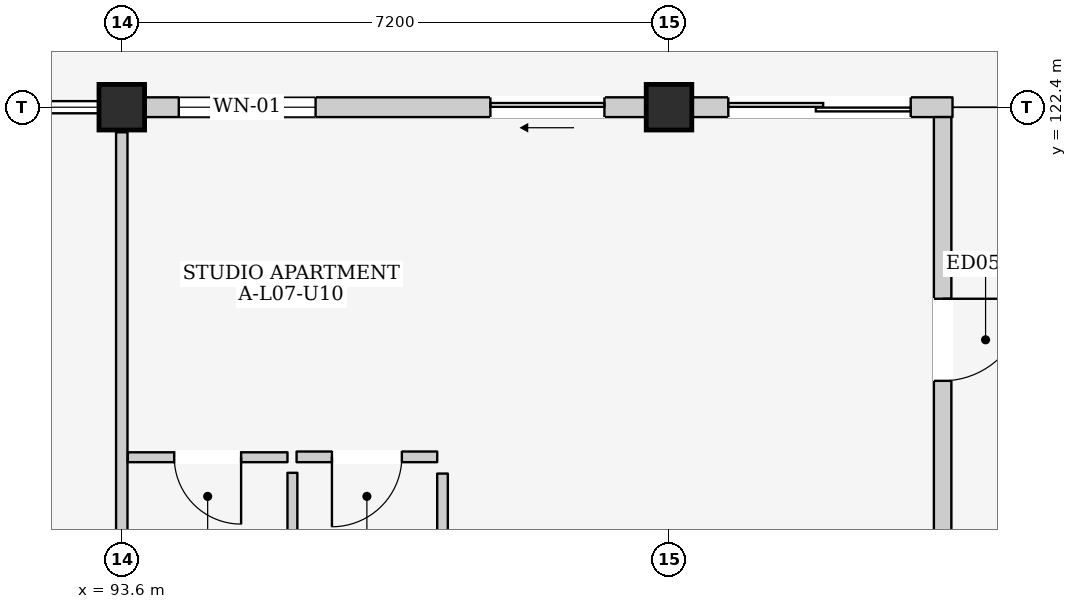
"""IFC4 building model, lengths in metres.
Left out: names, types, materials, properties, quantities, classifications, styles, units other than length and angle.
Written with IfcOpenShell. Run it as: python <this file> out.ifc"""

import sys

from ifc_helpers import new_model, si_unit, direction, frame, frame_2d, origin, origin_2d, place, context, subcontext, project, spatial, rectangle, extrude, element, fill, save


model = new_model("IFC4")
c1 = context("Model", 3, precision=1e-05, world=origin(), true_north=direction((0.0, 1.0)))
c2 = subcontext(c1, "Body", "Model", "MODEL_VIEW")
j1 = project(units=[si_unit("LENGTHUNIT", "METRE"), si_unit("PLANEANGLEUNIT", "RADIAN")], contexts=[c1])
p1 = place(None, origin())
s1 = spatial("IfcSite", under=j1, at=p1, CompositionType="ELEMENT")
p2 = place(p1, origin())
s2 = spatial("IfcBuilding", under=s1, at=p2, CompositionType="ELEMENT")
p3 = place(p2, frame((0.0, 0.0, 25.1)))
s3 = spatial("IfcBuildingStorey", under=s2, at=p3, CompositionType="ELEMENT", Elevation=25.1)
for number, where, z_axis, x_axis in (
    (1, (93.6, 122.4, 0.0), (0.0, 0.0, 1.0), (1.0, 0.0, 0.0)),
    (2, (100.8, 122.4, 0.0), (0.0, 0.0, 1.0), (1.0, 0.0, 0.0)),
):
    element("IfcColumn", number, at=place(p3, frame(where, z_axis=z_axis, x_axis=x_axis)), inside=s3, PredefinedType="COLUMN", context=c2, shape_type="SweptSolid", body=[
        extrude(rectangle(XDim=0.6, YDim=0.6, at=origin_2d()), origin(), (0.0, 0.0, 1.0), 3.2),
    ])
p4 = place(p3, frame((93.9, 122.4, 0.0), z_axis=(0.0, 0.0, 1.0), x_axis=(1.0, 0.0, 0.0)))
e3 = element("IfcWall", 3, at=p4, inside=s3, PredefinedType="ELEMENTEDWALL", context=c2, shape_type="SweptSolid", body=[
    extrude(rectangle(XDim=6.6, YDim=0.26, at=frame_2d((3.3, 0.0))), origin(), (0.0, 0.0, 1.0), 2.525),
])
p5 = place(p4, frame((4.55, 0.0, 0.0)))
e4 = element("IfcOpeningElement", 4, at=p5, cuts=e3, PredefinedType="OPENING", context=c2, shape_type="SweptSolid", body=[
    extrude(rectangle(XDim=1.5, YDim=2.12, at=frame_2d((0.75, 1.06))), frame((0.0, 0.145, 0.0), z_axis=(0.0, -1.0, 0.0), x_axis=(1.0, 0.0, 0.0)), (0.0, 0.0, 1.0), 0.29),
])
p6 = place(p4, frame((0.45, 0.0, 0.9)))
e5 = element("IfcOpeningElement", 5, at=p6, cuts=e3, PredefinedType="OPENING", context=c2, shape_type="SweptSolid", body=[
    extrude(rectangle(XDim=1.8, YDim=1.5, at=frame_2d((0.9, 0.75))), frame((0.0, 0.145, 0.0), z_axis=(0.0, -1.0, 0.0), x_axis=(1.0, 0.0, 0.0)), (0.0, 0.0, 1.0), 0.29),
])
p7 = place(p3, frame((101.1, 122.4, 0.0), z_axis=(0.0, 0.0, 1.0), x_axis=(1.0, 0.0, 0.0)))
e6 = element("IfcWall", 6, at=p7, inside=s3, PredefinedType="ELEMENTEDWALL", context=c2, shape_type="SweptSolid", body=[
    extrude(rectangle(XDim=3.43, YDim=0.26, at=frame_2d((1.715, 0.0))), origin(), (0.0, 0.0, 1.0), 2.325),
])
p8 = place(p7, frame((0.48, 0.0, 0.0)))
e7 = element("IfcOpeningElement", 7, at=p8, cuts=e6, PredefinedType="OPENING", context=c2, shape_type="SweptSolid", body=[
    extrude(rectangle(XDim=2.4, YDim=2.12, at=frame_2d((1.2, 1.06))), frame((0.0, 0.145, 0.0), z_axis=(0.0, -1.0, 0.0), x_axis=(1.0, 0.0, 0.0)), (0.0, 0.0, 1.0), 0.29),
])
p9 = place(p3, frame((104.4, 115.2, 0.0), z_axis=(0.0, 0.0, 1.0), x_axis=(0.0, 1.0, 0.0)))
e8 = element("IfcWall", 8, at=p9, inside=s3, PredefinedType="ELEMENTEDWALL", context=c2, shape_type="SweptSolid", body=[
    extrude(rectangle(XDim=7.07, YDim=0.23, at=frame_2d((3.535, 0.0))), origin(), (0.0, 0.0, 1.0), 2.425),
])
p10 = place(p9, frame((3.6, 0.0, 0.0)))
e9 = element("IfcOpeningElement", 9, at=p10, cuts=e8, PredefinedType="OPENING", context=c2, shape_type="SweptSolid", body=[
    extrude(rectangle(XDim=1.08, YDim=2.12, at=frame_2d((0.54, 1.06))), frame((0.0, 0.13, 0.0), z_axis=(0.0, -1.0, 0.0), x_axis=(1.0, 0.0, 0.0)), (0.0, 0.0, 1.0), 0.26),
])
p11 = place(p3, frame((93.6, 115.53, 0.0), z_axis=(0.0, 0.0, 1.0), x_axis=(0.0, 1.0, 0.0)))
e10 = element("IfcWall", 10, at=p11, inside=s3, PredefinedType="PARTITIONING", context=c2, shape_type="SweptSolid", body=[
    extrude(rectangle(XDim=6.54, YDim=0.15, at=frame_2d((3.27, 0.0))), origin(), (0.0, 0.0, 1.0), 2.475),
])
p12 = place(p3, frame((93.68, 117.795, 0.0), z_axis=(0.0, 0.0, 1.0), x_axis=(1.0, 0.0, 0.0)))
e11 = element("IfcWall", 11, at=p12, inside=s3, PredefinedType="PARTITIONING", context=c2, shape_type="SweptSolid", body=[
    extrude(rectangle(XDim=2.1, YDim=0.13, at=frame_2d((1.05, 0.0))), origin(), (0.0, 0.0, 1.0), 2.99),
])
p13 = place(p12, frame((0.61, 0.0, 0.0)))
e12 = element("IfcOpeningElement", 12, at=p13, cuts=e11, PredefinedType="OPENING", context=c2, shape_type="SweptSolid", body=[
    extrude(rectangle(XDim=0.88, YDim=2.1, at=frame_2d((0.44, 1.05))), frame((0.0, 0.08, 0.0), z_axis=(0.0, -1.0, 0.0), x_axis=(1.0, 0.0, 0.0)), (0.0, 0.0, 1.0), 0.16),
])
p14 = place(p3, frame((95.845, 115.46, 0.0), z_axis=(0.0, 0.0, 1.0), x_axis=(0.0, 1.0, 0.0)))
e13 = element("IfcWall", 13, at=p14, inside=s3, PredefinedType="PARTITIONING", context=c2, shape_type="SweptSolid", body=[
    extrude(rectangle(XDim=2.13, YDim=0.13, at=frame_2d((1.065, 0.0))), origin(), (0.0, 0.0, 1.0), 2.99),
])
p15 = place(p3, frame((95.9, 117.8, 0.0), z_axis=(0.0, 0.0, 1.0), x_axis=(1.0, 0.0, 0.0)))
e14 = element("IfcWall", 14, at=p15, inside=s3, PredefinedType="PARTITIONING", context=c2, shape_type="SweptSolid", body=[
    extrude(rectangle(XDim=1.85, YDim=0.14, at=frame_2d((0.925, 0.0))), origin(), (0.0, 0.0, 1.0), 2.99),
])
p16 = place(p15, frame((0.465, 0.0, 0.0)))
e15 = element("IfcOpeningElement", 15, at=p16, cuts=e14, PredefinedType="OPENING", context=c2, shape_type="SweptSolid", body=[
    extrude(rectangle(XDim=0.92, YDim=2.1, at=frame_2d((0.46, 1.05))), frame((0.0, 0.085, 0.0), z_axis=(0.0, -1.0, 0.0), x_axis=(1.0, 0.0, 0.0)), (0.0, 0.0, 1.0), 0.17),
])
p17 = place(p3, frame((97.82, 115.43, 0.0), z_axis=(0.0, 0.0, 1.0), x_axis=(0.0, 1.0, 0.0)))
e16 = element("IfcWall", 16, at=p17, inside=s3, PredefinedType="PARTITIONING", context=c2, shape_type="SweptSolid", body=[
    extrude(rectangle(XDim=2.15, YDim=0.14, at=frame_2d((1.075, 0.0))), origin(), (0.0, 0.0, 1.0), 2.99),
])
p18 = place(p5, frame((1.5, 0.0, 0.0), z_axis=(0.0, 0.0, 1.0), x_axis=(-1.0, 0.0, 0.0)))
e17 = element("IfcDoor", 17, at=p18, inside=s3, OperationType="SLIDING_TO_LEFT", PredefinedType="DOOR", context=c2, shape_type="SweptSolid", body=[
    extrude(rectangle(XDim=1.5, YDim=2.12, at=frame_2d((0.75, 1.06))), frame((0.0, 0.025, 0.0), z_axis=(0.0, -1.0, 0.0), x_axis=(1.0, 0.0, 0.0)), (0.0, 0.0, 1.0), 0.05),
])
fill(e4, e17)
p19 = place(p6, origin())
e18 = element("IfcWindow", 18, at=p19, inside=s3, PartitioningType="DOUBLE_PANEL_VERTICAL", PredefinedType="WINDOW", context=c2, shape_type="SweptSolid", body=[
    extrude(rectangle(XDim=1.8, YDim=1.5, at=frame_2d((0.9, 0.75))), frame((0.0, 0.03, 0.0), z_axis=(0.0, -1.0, 0.0), x_axis=(1.0, 0.0, 0.0)), (0.0, 0.0, 1.0), 0.06),
])
fill(e5, e18)
p20 = place(p8, frame((2.4, 0.0, 0.0), z_axis=(0.0, 0.0, 1.0), x_axis=(-1.0, 0.0, 0.0)))
e19 = element("IfcDoor", 19, at=p20, inside=s3, OperationType="DOUBLE_DOOR_SLIDING", PredefinedType="DOOR", context=c2, shape_type="SweptSolid", body=[
    extrude(rectangle(XDim=2.4, YDim=2.12, at=frame_2d((1.2, 1.06))), frame((0.0, 0.025, 0.0), z_axis=(0.0, -1.0, 0.0), x_axis=(1.0, 0.0, 0.0)), (0.0, 0.0, 1.0), 0.05),
])
fill(e7, e19)
p21 = place(p10, frame((1.08, 0.0, 0.0), z_axis=(0.0, 0.0, 1.0), x_axis=(-1.0, 0.0, 0.0)))
e20 = element("IfcDoor", 20, at=p21, inside=s3, OperationType="SINGLE_SWING_LEFT", PredefinedType="DOOR", context=c2, shape_type="SweptSolid", body=[
    extrude(rectangle(XDim=1.08, YDim=2.12, at=frame_2d((0.54, 1.06))), frame((0.0, 0.025, 0.0), z_axis=(0.0, -1.0, 0.0), x_axis=(1.0, 0.0, 0.0)), (0.0, 0.0, 1.0), 0.05),
])
fill(e9, e20)
p22 = place(p13, frame((0.88, 0.0, 0.0), z_axis=(0.0, 0.0, 1.0), x_axis=(-1.0, 0.0, 0.0)))
e21 = element("IfcDoor", 21, at=p22, inside=s3, OperationType="SINGLE_SWING_LEFT", PredefinedType="DOOR", context=c2, shape_type="SweptSolid", body=[
    extrude(rectangle(XDim=0.88, YDim=2.1, at=frame_2d((0.44, 1.05))), frame((0.0, 0.025, 0.0), z_axis=(0.0, -1.0, 0.0), x_axis=(1.0, 0.0, 0.0)), (0.0, 0.0, 1.0), 0.05),
])
fill(e12, e21)
p23 = place(p16, frame((0.92, 0.0, 0.0), z_axis=(0.0, 0.0, 1.0), x_axis=(-1.0, 0.0, 0.0)))
e22 = element("IfcDoor", 22, at=p23, inside=s3, OperationType="SINGLE_SWING_RIGHT", PredefinedType="DOOR", context=c2, shape_type="SweptSolid", body=[
    extrude(rectangle(XDim=0.92, YDim=2.1, at=frame_2d((0.46, 1.05))), frame((0.0, 0.025, 0.0), z_axis=(0.0, -1.0, 0.0), x_axis=(1.0, 0.0, 0.0)), (0.0, 0.0, 1.0), 0.05),
])
fill(e15, e22)
save(model, sys.argv[1])
